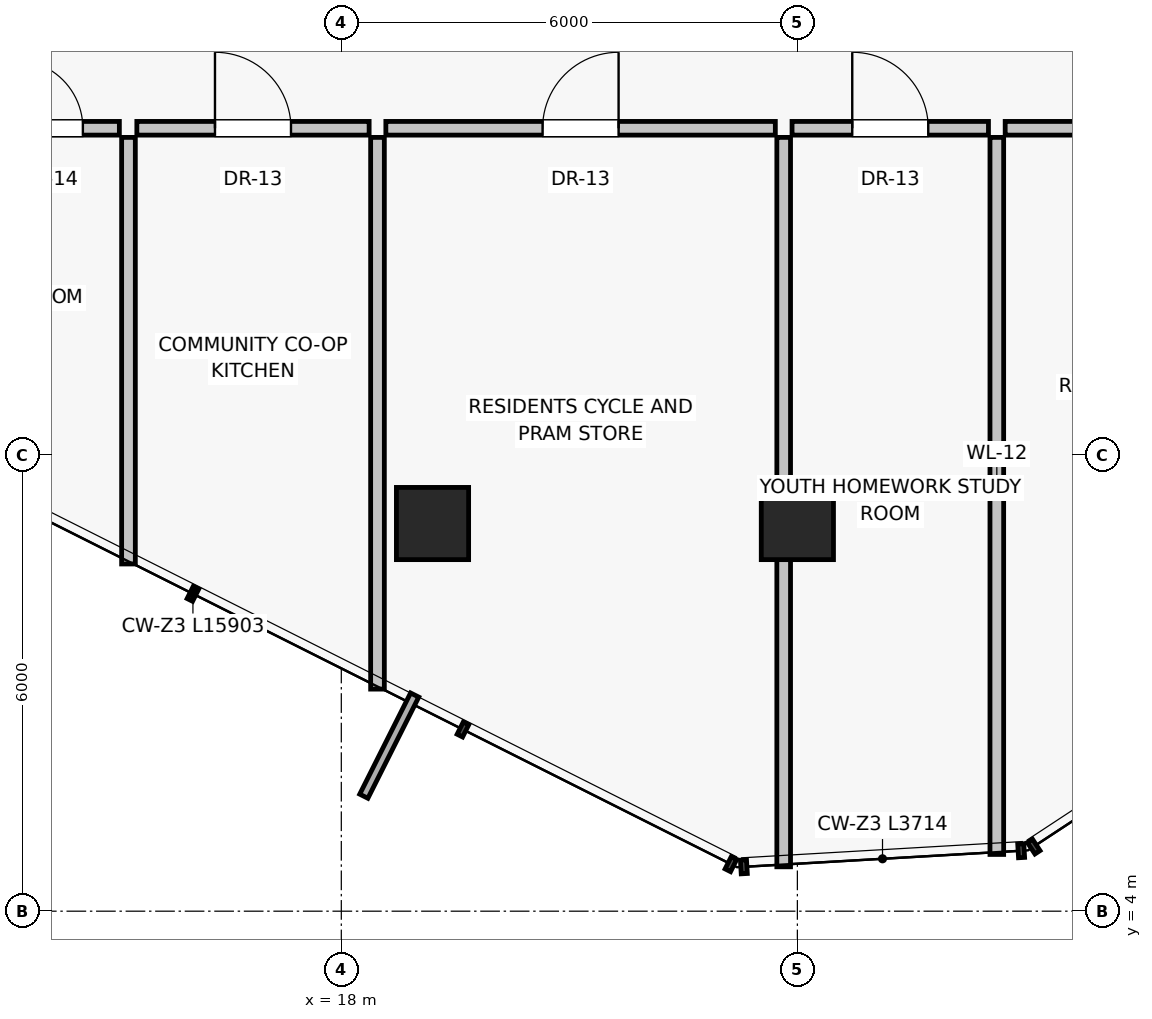
"""IFC4 building model, lengths in metres.
Left out: names, types, materials, properties, quantities, classifications, styles, units other than length and angle.
Written with IfcOpenShell. Run it as: python <this file> out.ifc"""

import sys

from ifc_helpers import new_model, si_unit, direction, frame, frame_2d, origin, origin_2d, place, context, subcontext, project, spatial, rectangle, extrude, source, transform, mapped, element, fill, save


model = new_model("IFC4")
c1 = context("Model", 3, precision=1e-05, world=origin(), true_north=direction((0.0, 1.0)))
c2 = subcontext(c1, "Body", "Model", "MODEL_VIEW")
j1 = project(units=[si_unit("LENGTHUNIT", "METRE"), si_unit("PLANEANGLEUNIT", "RADIAN")], contexts=[c1])
p1 = place(None, origin())
s1 = spatial("IfcSite", under=j1, at=p1, CompositionType="ELEMENT")
p2 = place(p1, origin())
s2 = spatial("IfcBuilding", under=s1, at=p2, CompositionType="ELEMENT")
p3 = place(p2, frame((0.0, 0.0, 195.1)))
s3 = spatial("IfcBuildingStorey", under=s2, at=p3, CompositionType="ELEMENT", Elevation=195.1)
for number, where, z_axis, x_axis in (
    (1, (19.2, 9.1, 0.0), (0.0, 0.0, 1.0), (1.0, 0.0, 0.0)),
    (2, (24.0, 9.1, 0.0), (0.0, 0.0, 1.0), (1.0, 0.0, 0.0)),
):
    element("IfcColumn", number, at=place(p3, frame(where, z_axis=z_axis, x_axis=x_axis)), inside=s3, PredefinedType="COLUMN", context=c2, shape_type="SweptSolid", body=[
        extrude(rectangle(XDim=0.95, YDim=0.95, at=origin_2d()), origin(), (0.0, 0.0, 1.0), 3.25),
    ])
p4 = place(p3, frame((15.2, 14.18, 0.0), z_axis=(0.0, 0.0, 1.0), x_axis=(0.0, -1.0, 0.0)))
e3 = element("IfcWall", 3, at=p4, inside=s3, PredefinedType="PARTITIONING", context=c2, shape_type="SweptSolid", body=[
    extrude(rectangle(XDim=5.612, YDim=0.18, at=frame_2d((2.806, 0.0))), origin(), (0.0, 0.0, 1.0), 3.015),
])
p5 = place(p3, frame((15.31, 14.3, 0.0), z_axis=(0.0, 0.0, 1.0), x_axis=(1.0, 0.0, 0.0)))
e4 = element("IfcWall", 4, at=p5, inside=s3, PredefinedType="PARTITIONING", context=c2, shape_type="SweptSolid", body=[
    extrude(rectangle(XDim=3.056, YDim=0.18, at=frame_2d((1.528, 0.0))), origin(), (0.0, 0.0, 1.0), 3.015),
])
p6 = place(p5, frame((1.028, 0.0, 0.0)))
e5 = element("IfcOpeningElement", 5, at=p6, cuts=e4, PredefinedType="OPENING", context=c2, shape_type="SweptSolid", body=[
    extrude(rectangle(XDim=1.0, YDim=2.01, at=frame_2d((0.5, 1.005))), frame((0.0, 0.1, 0.0), z_axis=(0.0, -1.0, 0.0), x_axis=(1.0, 0.0, 0.0)), (0.0, 0.0, 1.0), 0.2),
])
p7 = place(p3, frame((18.586, 14.3, 0.0), z_axis=(0.0, 0.0, 1.0), x_axis=(1.0, 0.0, 0.0)))
e6 = element("IfcWall", 6, at=p7, inside=s3, PredefinedType="PARTITIONING", context=c2, shape_type="SweptSolid", body=[
    extrude(rectangle(XDim=5.124, YDim=0.18, at=frame_2d((2.562, 0.0))), origin(), (0.0, 0.0, 1.0), 3.015),
])
p8 = place(p7, frame((2.062, 0.0, 0.0)))
e7 = element("IfcOpeningElement", 7, at=p8, cuts=e6, PredefinedType="OPENING", context=c2, shape_type="SweptSolid", body=[
    extrude(rectangle(XDim=1.0, YDim=2.01, at=frame_2d((0.5, 1.005))), frame((0.0, 0.1, 0.0), z_axis=(0.0, -1.0, 0.0), x_axis=(1.0, 0.0, 0.0)), (0.0, 0.0, 1.0), 0.2),
])
p9 = place(p3, frame((18.476, 14.18, 0.0), z_axis=(0.0, 0.0, 1.0), x_axis=(0.0, -1.0, 0.0)))
e8 = element("IfcWall", 8, at=p9, inside=s3, PredefinedType="PARTITIONING", context=c2, shape_type="SweptSolid", body=[
    extrude(rectangle(XDim=7.258, YDim=0.18, at=frame_2d((3.629, 0.0))), origin(), (0.0, 0.0, 1.0), 3.015),
])
p10 = place(p3, frame((23.82, 14.18, 0.0), z_axis=(0.0, 0.0, 1.0), x_axis=(0.0, -1.0, 0.0)))
e9 = element("IfcWall", 9, at=p10, inside=s3, PredefinedType="PARTITIONING", context=c2, shape_type="SweptSolid", body=[
    extrude(rectangle(XDim=9.596, YDim=0.18, at=frame_2d((4.798, 0.0))), origin(), (0.0, 0.0, 1.0), 3.015),
])
p11 = place(p3, frame((23.93, 14.3, 0.0), z_axis=(0.0, 0.0, 1.0), x_axis=(1.0, 0.0, 0.0)))
e10 = element("IfcWall", 10, at=p11, inside=s3, PredefinedType="PARTITIONING", context=c2, shape_type="SweptSolid", body=[
    extrude(rectangle(XDim=2.584, YDim=0.18, at=frame_2d((1.292, 0.0))), origin(), (0.0, 0.0, 1.0), 3.015),
])
p12 = place(p11, frame((0.792, 0.0, 0.0)))
e11 = element("IfcOpeningElement", 11, at=p12, cuts=e10, PredefinedType="OPENING", context=c2, shape_type="SweptSolid", body=[
    extrude(rectangle(XDim=1.0, YDim=2.01, at=frame_2d((0.5, 1.005))), frame((0.0, 0.1, 0.0), z_axis=(0.0, -1.0, 0.0), x_axis=(1.0, 0.0, 0.0)), (0.0, 0.0, 1.0), 0.2),
])
p13 = place(p3, frame((26.734, 14.3, 0.0), z_axis=(0.0, 0.0, 1.0), x_axis=(1.0, 0.0, 0.0)))
e12 = element("IfcWall", 12, at=p13, inside=s3, PredefinedType="PARTITIONING", context=c2, shape_type="SweptSolid", body=[
    extrude(rectangle(XDim=4.356, YDim=0.18, at=frame_2d((2.178, 0.0))), origin(), (0.0, 0.0, 1.0), 3.015),
])
p14 = place(p13, frame((1.678, 0.0, 0.0)))
e13 = element("IfcOpeningElement", 13, at=p14, cuts=e12, PredefinedType="OPENING", context=c2, shape_type="SweptSolid", body=[
    extrude(rectangle(XDim=1.0, YDim=2.01, at=frame_2d((0.5, 1.005))), frame((0.0, 0.1, 0.0), z_axis=(0.0, -1.0, 0.0), x_axis=(1.0, 0.0, 0.0)), (0.0, 0.0, 1.0), 0.2),
])
p15 = place(p3, frame((26.624, 14.18, 0.0), z_axis=(0.0, 0.0, 1.0), x_axis=(0.0, -1.0, 0.0)))
e14 = element("IfcWall", 14, at=p15, inside=s3, PredefinedType="PARTITIONING", context=c2, shape_type="SweptSolid", body=[
    extrude(rectangle(XDim=9.433, YDim=0.18, at=frame_2d((4.717, 0.0))), origin(), (0.0, 0.0, 1.0), 3.015),
])
p16 = place(p3, frame((13.22, 14.3, 0.0), z_axis=(0.0, 0.0, 1.0), x_axis=(1.0, 0.0, 0.0)))
e15 = element("IfcWall", 15, at=p16, inside=s3, PredefinedType="PARTITIONING", context=c2, shape_type="SweptSolid", body=[
    extrude(rectangle(XDim=1.86, YDim=0.18, at=frame_2d((0.93, 0.0))), origin(), (0.0, 0.0, 1.0), 3.015),
])
p17 = place(p16, frame((0.48, 0.0, 0.0)))
e16 = element("IfcOpeningElement", 16, at=p17, cuts=e15, PredefinedType="OPENING", context=c2, shape_type="SweptSolid", body=[
    extrude(rectangle(XDim=0.9, YDim=2.01, at=frame_2d((0.45, 1.005))), frame((0.0, 0.1, 0.0), z_axis=(0.0, -1.0, 0.0), x_axis=(1.0, 0.0, 0.0)), (0.0, 0.0, 1.0), 0.2),
])
m1 = source(origin(), c2, "Body", "SweptSolid", [
    extrude(rectangle(XDim=1.0, YDim=2.01, at=frame_2d((0.5, 1.005))), frame((0.0, 0.025, 0.0), z_axis=(0.0, -1.0, 0.0), x_axis=(1.0, 0.0, 0.0)), (0.0, 0.0, 1.0), 0.05),
])
p18 = place(p6, origin())
e17 = element("IfcDoor", 17, at=p18, inside=s3, OperationType="SINGLE_SWING_LEFT", PredefinedType="DOOR", context=c2, shape_type="MappedRepresentation", body=[
    mapped(m1, transform((0.0, 0.0, 0.0), scale=1.0)),
])
fill(e5, e17)
p19 = place(p8, origin())
e18 = element("IfcDoor", 18, at=p19, inside=s3, OperationType="SINGLE_SWING_RIGHT", PredefinedType="DOOR", context=c2, shape_type="MappedRepresentation", body=[
    mapped(m1, transform((0.0, 0.0, 0.0), scale=1.0)),
])
fill(e7, e18)
p20 = place(p12, origin())
e19 = element("IfcDoor", 19, at=p20, inside=s3, OperationType="SINGLE_SWING_LEFT", PredefinedType="DOOR", context=c2, shape_type="MappedRepresentation", body=[
    mapped(m1, transform((0.0, 0.0, 0.0), scale=1.0)),
])
fill(e11, e19)
m2 = source(origin(), c2, "Body", "SweptSolid", [
    extrude(rectangle(XDim=0.9, YDim=2.01, at=frame_2d((0.45, 1.005))), frame((0.0, 0.025, 0.0), z_axis=(0.0, -1.0, 0.0), x_axis=(1.0, 0.0, 0.0)), (0.0, 0.0, 1.0), 0.05),
])
p21 = place(p17, origin())
e20 = element("IfcDoor", 20, at=p21, inside=s3, OperationType="SINGLE_SWING_LEFT", PredefinedType="DOOR", context=c2, shape_type="MappedRepresentation", body=[
    mapped(m2, transform((0.0, 0.0, 0.0), scale=1.0)),
])
fill(e16, e20)
save(model, sys.argv[1])
